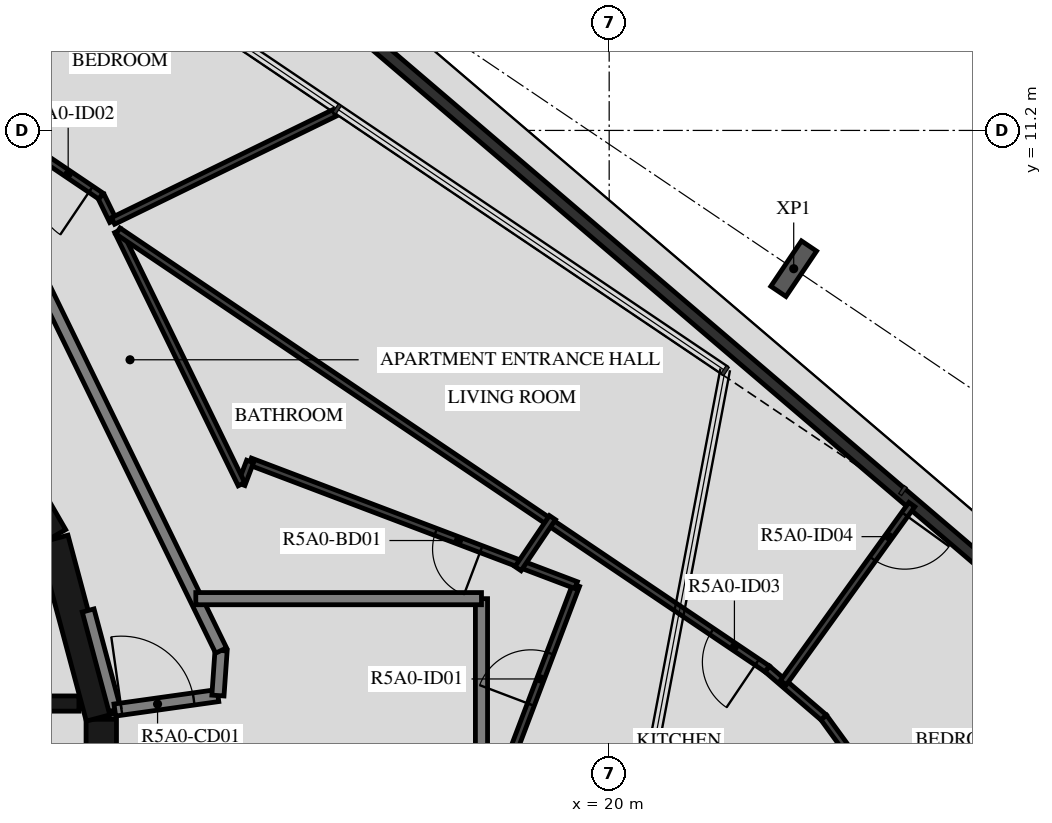
"""IFC4 building model, lengths in metres.
Left out: names, types, materials, properties, quantities, classifications, styles, units other than length and angle.
Written with IfcOpenShell. Run it as: python <this file> out.ifc"""

import sys

from ifc_helpers import new_model, si_unit, direction, frame, frame_2d, origin, origin_2d, place, context, subcontext, project, spatial, rectangle, i_section, extrude, element, fill, save


model = new_model("IFC4")
c1 = context("Model", 3, precision=1e-05, world=origin(), true_north=direction((0.0, 1.0)))
c2 = subcontext(c1, "Body", "Model", "MODEL_VIEW")
j1 = project(units=[si_unit("LENGTHUNIT", "METRE"), si_unit("PLANEANGLEUNIT", "RADIAN")], contexts=[c1])
p1 = place(None, origin())
s1 = spatial("IfcSite", under=j1, at=p1, CompositionType="ELEMENT")
p2 = place(p1, origin())
s2 = spatial("IfcBuilding", under=s1, at=p2, CompositionType="ELEMENT")
p3 = place(p2, frame((0.0, 0.0, 188.4)))
s3 = spatial("IfcBuildingStorey", under=s2, at=p3, CompositionType="ELEMENT", Elevation=188.4)
p4 = place(p3, frame((23.035, 8.926, -0.45), z_axis=(0.0, 0.0, 1.0), x_axis=(0.829037661466, -0.559192771654, 0.0)))
e1 = element("IfcColumn", 1, at=p4, inside=s3, PredefinedType="COLUMN", context=c2, shape_type="SweptSolid", body=[
    extrude(i_section(OverallWidth=0.3, OverallDepth=0.9, WebThickness=0.019, FlangeThickness=0.035, FilletRadius=0.03, at=origin_2d()), origin(), (0.0, 0.0, 1.0), 3.57),
])
p5 = place(p3, frame((-0.808, 27.101, 0.03), z_axis=(0.0, 0.0, 1.0), x_axis=(0.76040780846, -0.649445890613, 0.0)))
e2 = element("IfcWall", 2, at=p5, inside=s3, PredefinedType="PARAPET", context=c2, shape_type="SweptSolid", body=[
    extrude(rectangle(XDim=36.429, YDim=0.2, at=frame_2d((18.214, 0.0))), origin(), (0.0, 0.0, 1.0), 1.5),
])
p6 = place(p3, frame((11.647, -1.516, 0.0), z_axis=(0.0, 0.0, 1.0), x_axis=(0.0, 1.0, 0.0)))
e3 = element("IfcWall", 3, at=p6, inside=s3, PredefinedType="SHEAR", context=c2, shape_type="SweptSolid", body=[
    extrude(rectangle(XDim=3.033, YDim=0.5, at=frame_2d((1.516, 0.0))), origin(), (0.0, 0.0, 1.0), 3.12),
])
p7 = place(p6, frame((0.616, 0.0, 0.0)))
e4 = element("IfcOpeningElement", 4, at=p7, cuts=e3, PredefinedType="OPENING", context=c2, shape_type="SweptSolid", body=[
    extrude(rectangle(XDim=1.8, YDim=2.1, at=frame_2d((0.9, 1.05))), frame((0.0, 0.26, 0.0), z_axis=(0.0, -1.0, 0.0), x_axis=(1.0, 0.0, 0.0)), (0.0, 0.0, 1.0), 0.52),
])
for number, where, z_axis, x_axis in (
    (5, (11.643, 1.55, 0.0), (0.0, 0.0, 1.0), (-0.259, 0.966, 0.0)),
    (6, (10.845, 4.51, 0.0), (0.0, 0.0, 1.0), (-0.5, 0.866, 0.0)),
):
    element("IfcWall", number, at=place(p3, frame(where, z_axis=z_axis, x_axis=x_axis)), inside=s3, PredefinedType="SHEAR", context=c2, shape_type="SweptSolid", body=[
        extrude(rectangle(XDim=3.033, YDim=0.5, at=frame_2d((1.516, 0.0))), origin(), (0.0, 0.0, 1.0), 3.12),
    ])
p8 = place(p3, frame((3.35, 1.775, 0.0), z_axis=(0.0, 0.0, 1.0), x_axis=(1.0, 0.0, 0.0)))
e7 = element("IfcWall", 7, at=p8, inside=s3, PredefinedType="SHEAR", context=c2, shape_type="SweptSolid", body=[
    extrude(rectangle(XDim=7.93, YDim=0.25, at=frame_2d((3.965, 0.0))), origin(), (0.0, 0.0, 1.0), 3.12),
])
p9 = place(p8, frame((0.35, 0.0, 0.0)))
e8 = element("IfcOpeningElement", 8, at=p9, cuts=e7, PredefinedType="OPENING", context=c2, shape_type="SweptSolid", body=[
    extrude(rectangle(XDim=1.2, YDim=2.4, at=frame_2d((0.6, 1.2))), frame((0.0, 0.135, 0.0), z_axis=(0.0, -1.0, 0.0), x_axis=(1.0, 0.0, 0.0)), (0.0, 0.0, 1.0), 0.27),
])
p10 = place(p8, frame((2.5, 0.0, 0.0)))
e9 = element("IfcOpeningElement", 9, at=p10, cuts=e7, PredefinedType="OPENING", context=c2, shape_type="SweptSolid", body=[
    extrude(rectangle(XDim=1.2, YDim=2.4, at=frame_2d((0.6, 1.2))), frame((0.0, 0.135, 0.0), z_axis=(0.0, -1.0, 0.0), x_axis=(1.0, 0.0, 0.0)), (0.0, 0.0, 1.0), 0.27),
])
p11 = place(p8, frame((4.8, 0.0, 0.0)))
e10 = element("IfcOpeningElement", 10, at=p11, cuts=e7, PredefinedType="OPENING", context=c2, shape_type="SweptSolid", body=[
    extrude(rectangle(XDim=0.9, YDim=2.1, at=frame_2d((0.45, 1.05))), frame((0.0, 0.135, 0.0), z_axis=(0.0, -1.0, 0.0), x_axis=(1.0, 0.0, 0.0)), (0.0, 0.0, 1.0), 0.27),
])
p12 = place(p3, frame((11.87, 1.668, 0.0), z_axis=(0.0, 0.0, 1.0), x_axis=(-0.258836880648, 0.965921047093, 0.0)))
e11 = element("IfcWall", 11, at=p12, inside=s3, PredefinedType="STANDARD", context=c2, shape_type="SweptSolid", body=[
    extrude(rectangle(XDim=1.695, YDim=0.2, at=frame_2d((0.848, 0.0))), origin(), (0.0, 0.0, 1.0), 3.12),
])
p13 = place(p3, frame((11.87, 1.668, 0.0), z_axis=(0.0, 0.0, 1.0), x_axis=(0.990271931984, 0.139145609792, 0.0)))
e12 = element("IfcWall", 12, at=p13, inside=s3, PredefinedType="STANDARD", context=c2, shape_type="SweptSolid", body=[
    extrude(rectangle(XDim=1.712, YDim=0.2, at=frame_2d((0.856, 0.0))), origin(), (0.0, 0.0, 1.0), 3.12),
])
p14 = place(p13, frame((0.11, 0.0, 0.0)))
e13 = element("IfcOpeningElement", 13, at=p14, cuts=e12, PredefinedType="OPENING", context=c2, shape_type="SweptSolid", body=[
    extrude(rectangle(XDim=1.2, YDim=2.1, at=frame_2d((0.6, 1.05))), frame((0.0, 0.11, 0.0), z_axis=(0.0, -1.0, 0.0), x_axis=(1.0, 0.0, 0.0)), (0.0, 0.0, 1.0), 0.22),
])
p15 = place(p3, frame((13.566, 1.906, 0.0), z_axis=(0.0, 0.0, 1.0), x_axis=(0.07005495793, 0.997543133338, 0.0)))
e14 = element("IfcWall", 14, at=p15, inside=s3, PredefinedType="STANDARD", context=c2, shape_type="SweptSolid", body=[
    extrude(rectangle(XDim=0.742, YDim=0.2, at=frame_2d((0.371, 0.0))), origin(), (0.0, 0.0, 1.0), 3.12),
])
p16 = place(p3, frame((13.618, 2.647, 0.0), z_axis=(0.0, 0.0, 1.0), x_axis=(-0.438366026218, 0.898796543751, 0.0)))
e15 = element("IfcWall", 15, at=p16, inside=s3, PredefinedType="STANDARD", context=c2, shape_type="SweptSolid", body=[
    extrude(rectangle(XDim=7.181, YDim=0.2, at=frame_2d((3.591, 0.0))), origin(), (0.0, 0.0, 1.0), 3.12),
])
p17 = place(p3, frame((17.9, -3.5, 0.0), z_axis=(0.0, 0.0, 1.0), x_axis=(0.0, 1.0, 0.0)))
e16 = element("IfcWall", 16, at=p17, inside=s3, PredefinedType="STANDARD", context=c2, shape_type="SweptSolid", body=[
    extrude(rectangle(XDim=7.0, YDim=0.2, at=frame_2d((3.5, 0.0))), origin(), (0.0, 0.0, 1.0), 3.12),
])
p18 = place(p3, frame((17.9, 3.5, 0.0), z_axis=(0.0, 0.0, 1.0), x_axis=(-1.0, 0.0, 0.0)))
e17 = element("IfcWall", 17, at=p18, inside=s3, PredefinedType="STANDARD", context=c2, shape_type="SweptSolid", body=[
    extrude(rectangle(XDim=4.698, YDim=0.2, at=frame_2d((2.349, 0.0))), origin(), (0.0, 0.0, 1.0), 3.12),
])
p19 = place(p3, frame((18.286, 0.637, 0.0), z_axis=(0.0, 0.0, 1.0), x_axis=(0.354672075988, 0.934990758518, 0.0)))
e18 = element("IfcWall", 18, at=p19, inside=s3, PredefinedType="PARTITIONING", context=c2, shape_type="SweptSolid", body=[
    extrude(rectangle(XDim=3.3, YDim=0.12, at=frame_2d((1.65, 0.0))), origin(), (0.0, 0.0, 1.0), 3.12),
])
p20 = place(p19, frame((1.2, 0.0, 0.0)))
e19 = element("IfcOpeningElement", 19, at=p20, cuts=e18, PredefinedType="OPENING", context=c2, shape_type="SweptSolid", body=[
    extrude(rectangle(XDim=0.9, YDim=2.1, at=frame_2d((0.45, 1.05))), frame((0.0, 0.07, 0.0), z_axis=(0.0, -1.0, 0.0), x_axis=(1.0, 0.0, 0.0)), (0.0, 0.0, 1.0), 0.14),
])
p21 = place(p3, frame((19.456, 3.722, 0.0), z_axis=(0.0, 0.0, 1.0), x_axis=(-0.935017484321, 0.3546016131, 0.0)))
e20 = element("IfcWall", 20, at=p21, inside=s3, PredefinedType="PARTITIONING", context=c2, shape_type="SweptSolid", body=[
    extrude(rectangle(XDim=5.734, YDim=0.12, at=frame_2d((2.867, 0.0))), origin(), (0.0, 0.0, 1.0), 3.12),
])
p22 = place(p21, frame((1.669, 0.0, 0.0)))
e21 = element("IfcOpeningElement", 21, at=p22, cuts=e20, PredefinedType="OPENING", context=c2, shape_type="SweptSolid", body=[
    extrude(rectangle(XDim=0.8, YDim=2.1, at=frame_2d((0.4, 1.05))), frame((0.0, 0.07, 0.0), z_axis=(0.0, -1.0, 0.0), x_axis=(1.0, 0.0, 0.0)), (0.0, 0.0, 1.0), 0.14),
])
p23 = place(p3, frame((14.094, 5.756, 0.0), z_axis=(0.0, 0.0, 1.0), x_axis=(-0.354267529254, -0.935144116014, 0.0)))
e22 = element("IfcWall", 22, at=p23, inside=s3, PredefinedType="PARTITIONING", context=c2, shape_type="SweptSolid", body=[
    extrude(rectangle(XDim=0.4, YDim=0.12, at=frame_2d((0.2, 0.0))), origin(), (0.0, 0.0, 1.0), 3.12),
])
p24 = place(p3, frame((13.953, 5.382, 0.0), z_axis=(0.0, 0.0, 1.0), x_axis=(-0.438382107355, 0.898788700391, 0.0)))
e23 = element("IfcWall", 23, at=p24, inside=s3, PredefinedType="PARTITIONING", context=c2, shape_type="SweptSolid", body=[
    extrude(rectangle(XDim=4.634, YDim=0.12, at=frame_2d((2.317, 0.0))), origin(), (0.0, 0.0, 1.0), 3.12),
])
p25 = place(p3, frame((11.841, 9.712, 0.0), z_axis=(0.0, 0.0, 1.0), x_axis=(-0.438381293215, 0.898789097486, 0.0)))
e24 = element("IfcWall", 24, at=p25, inside=s3, PredefinedType="PARTITIONING", context=c2, shape_type="SweptSolid", body=[
    extrude(rectangle(XDim=0.454, YDim=0.12, at=frame_2d((0.227, 0.0))), origin(), (0.0, 0.0, 1.0), 3.12),
])
p26 = place(p3, frame((11.642, 10.12, 0.0), z_axis=(0.0, 0.0, 1.0), x_axis=(-0.829032241779, 0.55920080659, 0.0)))
e25 = element("IfcWall", 25, at=p26, inside=s3, PredefinedType="PARTITIONING", context=c2, shape_type="SweptSolid", body=[
    extrude(rectangle(XDim=7.985, YDim=0.12, at=frame_2d((3.992, 0.0))), origin(), (0.0, 0.0, 1.0), 3.12),
])
p27 = place(p26, frame((0.2, 0.0, 0.0)))
e26 = element("IfcOpeningElement", 26, at=p27, cuts=e25, PredefinedType="OPENING", context=c2, shape_type="SweptSolid", body=[
    extrude(rectangle(XDim=0.9, YDim=2.1, at=frame_2d((0.45, 1.05))), frame((0.0, 0.07, 0.0), z_axis=(0.0, -1.0, 0.0), x_axis=(1.0, 0.0, 0.0)), (0.0, 0.0, 1.0), 0.14),
])
p28 = place(p26, frame((5.475, 0.0, 0.0)))
e27 = element("IfcOpeningElement", 27, at=p28, cuts=e25, PredefinedType="OPENING", context=c2, shape_type="SweptSolid", body=[
    extrude(rectangle(XDim=0.9, YDim=2.1, at=frame_2d((0.45, 1.05))), frame((0.0, 0.07, 0.0), z_axis=(0.0, -1.0, 0.0), x_axis=(1.0, 0.0, 0.0)), (0.0, 0.0, 1.0), 0.14),
])
p29 = place(p3, frame((22.598, 2.345, 0.0), z_axis=(0.0, 0.0, 1.0), x_axis=(0.758596166141, -0.651561092083, 0.0)))
e28 = element("IfcWall", 28, at=p29, inside=s3, PredefinedType="PARTITIONING", context=c2, shape_type="SweptSolid", body=[
    extrude(rectangle(XDim=1.227, YDim=0.12, at=frame_2d((0.614, 0.0))), origin(), (0.0, 0.0, 1.0), 3.12),
])
p30 = place(p3, frame((23.529, 1.545, 0.0), z_axis=(0.0, 0.0, 1.0), x_axis=(0.587742994292, -0.809047694923, 0.0)))
e29 = element("IfcWall", 29, at=p30, inside=s3, PredefinedType="PARTITIONING", context=c2, shape_type="SweptSolid", body=[
    extrude(rectangle(XDim=1.016, YDim=0.12, at=frame_2d((0.508, 0.0))), origin(), (0.0, 0.0, 1.0), 3.12),
])
p31 = place(p3, frame((24.978, 5.047, 0.0), z_axis=(0.0, 0.0, 1.0), x_axis=(-0.585041443684, -0.811003396523, 0.0)))
e30 = element("IfcWall", 30, at=p31, inside=s3, PredefinedType="PARTITIONING", context=c2, shape_type="SweptSolid", body=[
    extrude(rectangle(XDim=3.613, YDim=0.12, at=frame_2d((1.807, 0.0))), origin(), (0.0, 0.0, 1.0), 3.12),
])
p32 = place(p31, frame((0.2, 0.0, 0.0)))
e31 = element("IfcOpeningElement", 31, at=p32, cuts=e30, PredefinedType="OPENING", context=c2, shape_type="SweptSolid", body=[
    extrude(rectangle(XDim=0.9, YDim=2.1, at=frame_2d((0.45, 1.05))), frame((0.0, 0.07, 0.0), z_axis=(0.0, -1.0, 0.0), x_axis=(1.0, 0.0, 0.0)), (0.0, 0.0, 1.0), 0.14),
])
p33 = place(p3, frame((22.598, 2.345, 0.0), z_axis=(0.0, 0.0, 1.0), x_axis=(-0.829034113947, 0.559198031034, 0.0)))
e32 = element("IfcWall", 32, at=p33, inside=s3, PredefinedType="PARTITIONING", context=c2, shape_type="SweptSolid", body=[
    extrude(rectangle(XDim=12.879, YDim=0.12, at=frame_2d((6.439, 0.0))), origin(), (0.0, 0.0, 1.0), 3.12),
])
p34 = place(p33, frame((0.2, 0.0, 0.0)))
e33 = element("IfcOpeningElement", 33, at=p34, cuts=e32, PredefinedType="OPENING", context=c2, shape_type="SweptSolid", body=[
    extrude(rectangle(XDim=0.9, YDim=2.1, at=frame_2d((0.45, 1.05))), frame((0.0, 0.07, 0.0), z_axis=(0.0, -1.0, 0.0), x_axis=(1.0, 0.0, 0.0)), (0.0, 0.0, 1.0), 0.14),
])
p35 = place(p3, frame((19.067, 4.832, 0.0), z_axis=(0.0, 0.0, 1.0), x_axis=(-0.559257363459, -0.828994090098, 0.0)))
e34 = element("IfcWall", 34, at=p35, inside=s3, PredefinedType="PARTITIONING", context=c2, shape_type="SweptSolid", body=[
    extrude(rectangle(XDim=1.012, YDim=0.12, at=frame_2d((0.506, 0.0))), origin(), (0.0, 0.0, 1.0), 3.12),
])
p36 = place(p3, frame((15.482, 11.487, 0.0), z_axis=(0.0, 0.0, 1.0), x_axis=(-0.898807251285, -0.438344071521, 0.0)))
e35 = element("IfcWall", 35, at=p36, inside=s3, PredefinedType="PARTITIONING", context=c2, shape_type="SweptSolid", body=[
    extrude(rectangle(XDim=4.051, YDim=0.12, at=frame_2d((2.025, 0.0))), origin(), (0.0, 0.0, 1.0), 3.12),
])
p37 = place(p20, origin())
e36 = element("IfcDoor", 36, at=p37, inside=s3, OperationType="SINGLE_SWING_LEFT", PredefinedType="DOOR", context=c2, shape_type="SweptSolid", body=[
    extrude(rectangle(XDim=0.9, YDim=2.1, at=frame_2d((0.45, 1.05))), frame((0.0, 0.025, 0.0), z_axis=(0.0, -1.0, 0.0), x_axis=(1.0, 0.0, 0.0)), (0.0, 0.0, 1.0), 0.05),
])
fill(e19, e36)
p38 = place(p22, origin())
e37 = element("IfcDoor", 37, at=p38, inside=s3, OperationType="SINGLE_SWING_LEFT", PredefinedType="DOOR", context=c2, shape_type="SweptSolid", body=[
    extrude(rectangle(XDim=0.8, YDim=2.1, at=frame_2d((0.4, 1.05))), frame((0.0, 0.025, 0.0), z_axis=(0.0, -1.0, 0.0), x_axis=(1.0, 0.0, 0.0)), (0.0, 0.0, 1.0), 0.05),
])
fill(e21, e37)
p39 = place(p27, origin())
e38 = element("IfcDoor", 38, at=p39, inside=s3, OperationType="SINGLE_SWING_LEFT", PredefinedType="DOOR", context=c2, shape_type="SweptSolid", body=[
    extrude(rectangle(XDim=0.9, YDim=2.1, at=frame_2d((0.45, 1.05))), frame((0.0, 0.025, 0.0), z_axis=(0.0, -1.0, 0.0), x_axis=(1.0, 0.0, 0.0)), (0.0, 0.0, 1.0), 0.05),
])
fill(e26, e38)
p40 = place(p34, origin())
e39 = element("IfcDoor", 39, at=p40, inside=s3, OperationType="SINGLE_SWING_LEFT", PredefinedType="DOOR", context=c2, shape_type="SweptSolid", body=[
    extrude(rectangle(XDim=0.9, YDim=2.1, at=frame_2d((0.45, 1.05))), frame((0.0, 0.025, 0.0), z_axis=(0.0, -1.0, 0.0), x_axis=(1.0, 0.0, 0.0)), (0.0, 0.0, 1.0), 0.05),
])
fill(e33, e39)
p41 = place(p32, origin())
e40 = element("IfcDoor", 40, at=p41, inside=s3, OperationType="SINGLE_SWING_LEFT", PredefinedType="DOOR", context=c2, shape_type="SweptSolid", body=[
    extrude(rectangle(XDim=0.9, YDim=2.1, at=frame_2d((0.45, 1.05))), frame((0.0, 0.025, 0.0), z_axis=(0.0, -1.0, 0.0), x_axis=(1.0, 0.0, 0.0)), (0.0, 0.0, 1.0), 0.05),
])
fill(e31, e40)
p42 = place(p14, origin())
e41 = element("IfcDoor", 41, at=p42, inside=s3, OperationType="DOUBLE_DOOR_SINGLE_SWING", PredefinedType="DOOR", context=c2, shape_type="SweptSolid", body=[
    extrude(rectangle(XDim=1.2, YDim=2.1, at=frame_2d((0.6, 1.05))), frame((0.0, 0.025, 0.0), z_axis=(0.0, -1.0, 0.0), x_axis=(1.0, 0.0, 0.0)), (0.0, 0.0, 1.0), 0.05),
])
fill(e13, e41)
save(model, sys.argv[1])
